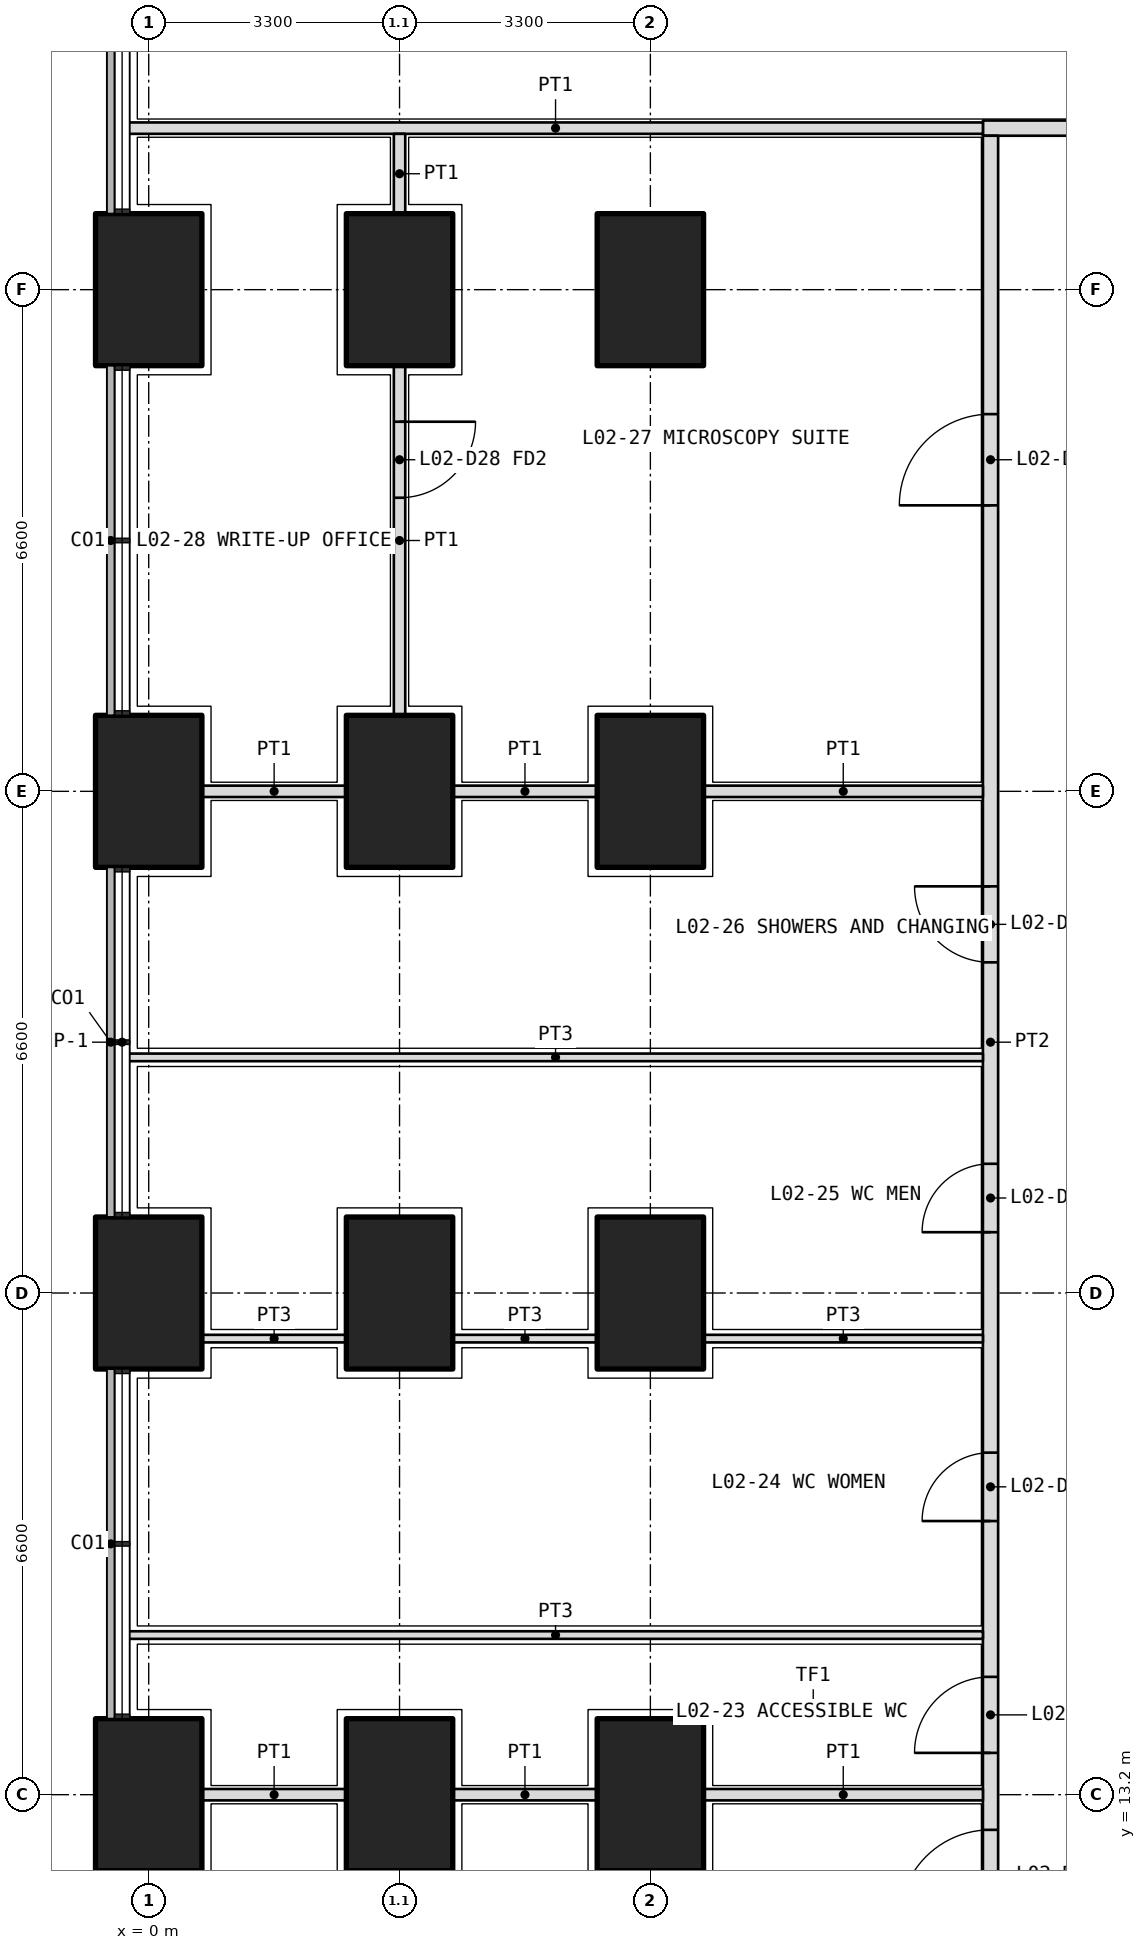
"""IFC4 building model, lengths in metres.
Left out: names, types, materials, properties, quantities, classifications, styles, units other than length and angle.
Written with IfcOpenShell. Run it as: python <this file> out.ifc"""

import sys

from ifc_helpers import new_model, si_unit, direction, frame, frame_2d, origin, origin_2d, place, context, subcontext, project, spatial, rectangle, extrude, element, fill, save


model = new_model("IFC4")
c1 = context("Model", 3, precision=1e-05, world=origin(), true_north=direction((0.0, 1.0)))
c2 = subcontext(c1, "Body", "Model", "MODEL_VIEW")
j1 = project(units=[si_unit("LENGTHUNIT", "METRE"), si_unit("PLANEANGLEUNIT", "RADIAN")], contexts=[c1])
p1 = place(None, origin())
s1 = spatial("IfcSite", under=j1, at=p1, CompositionType="ELEMENT")
p2 = place(p1, origin())
s2 = spatial("IfcBuilding", under=s1, at=p2, CompositionType="ELEMENT")
p3 = place(p2, frame((0.0, 0.0, 12.6)))
s3 = spatial("IfcBuildingStorey", under=s2, at=p3, CompositionType="ELEMENT", Elevation=12.6)
for number, where, z_axis, x_axis in (
    (1, (0.0, 13.2, 0.0), (0.0, 0.0, 1.0), (0.0, 1.0, 0.0)),
    (2, (0.0, 19.8, 0.0), (0.0, 0.0, 1.0), (0.0, 1.0, 0.0)),
    (3, (0.0, 26.4, 0.0), (0.0, 0.0, 1.0), (0.0, 1.0, 0.0)),
    (4, (0.0, 33.0, 0.0), (0.0, 0.0, 1.0), (0.0, 1.0, 0.0)),
    (5, (3.3, 13.2, 0.0), (0.0, 0.0, 1.0), (0.0, 1.0, 0.0)),
    (6, (3.3, 19.8, 0.0), (0.0, 0.0, 1.0), (0.0, 1.0, 0.0)),
    (7, (3.3, 26.4, 0.0), (0.0, 0.0, 1.0), (0.0, 1.0, 0.0)),
    (8, (3.3, 33.0, 0.0), (0.0, 0.0, 1.0), (0.0, 1.0, 0.0)),
    (9, (6.6, 13.2, 0.0), (0.0, 0.0, 1.0), (0.0, 1.0, 0.0)),
    (10, (6.6, 19.8, 0.0), (0.0, 0.0, 1.0), (0.0, 1.0, 0.0)),
    (11, (6.6, 26.4, 0.0), (0.0, 0.0, 1.0), (0.0, 1.0, 0.0)),
    (12, (6.6, 33.0, 0.0), (0.0, 0.0, 1.0), (0.0, 1.0, 0.0)),
):
    element("IfcColumn", number, at=place(p3, frame(where, z_axis=z_axis, x_axis=x_axis)), inside=s3, PredefinedType="COLUMN", context=c2, shape_type="SweptSolid", body=[
        extrude(rectangle(XDim=2.0, YDim=1.4, at=origin_2d()), origin(), (0.0, 0.0, 1.0), 4.5),
    ])
p4 = place(p3, frame((10.975, 35.125, 0.0), z_axis=(0.0, 0.0, 1.0), x_axis=(1.0, 0.0, 0.0)))
e13 = element("IfcWall", 13, at=p4, inside=s3, PredefinedType="PARTITIONING", context=c2, shape_type="SweptSolid", body=[
    extrude(rectangle(XDim=30.85, YDim=0.2, at=frame_2d((15.425, 0.0))), origin(), (0.0, 0.0, 1.0), 3.15),
])
p5 = place(p4, frame((3.962, 0.0, 0.0)))
e14 = element("IfcOpeningElement", 14, at=p5, cuts=e13, PredefinedType="OPENING", context=c2, shape_type="SweptSolid", body=[
    extrude(rectangle(XDim=1.0, YDim=2.1, at=frame_2d((0.5, 1.05))), frame((0.0, 0.11, 0.0), z_axis=(0.0, -1.0, 0.0), x_axis=(1.0, 0.0, 0.0)), (0.0, 0.0, 1.0), 0.22),
])
p6 = place(p4, frame((14.825, 0.0, 0.0)))
e15 = element("IfcOpeningElement", 15, at=p6, cuts=e13, PredefinedType="OPENING", context=c2, shape_type="SweptSolid", body=[
    extrude(rectangle(XDim=1.2, YDim=2.1, at=frame_2d((0.6, 1.05))), frame((0.0, 0.11, 0.0), z_axis=(0.0, -1.0, 0.0), x_axis=(1.0, 0.0, 0.0)), (0.0, 0.0, 1.0), 0.22),
])
p7 = place(p4, frame((25.788, 0.0, 0.0)))
e16 = element("IfcOpeningElement", 16, at=p7, cuts=e13, PredefinedType="OPENING", context=c2, shape_type="SweptSolid", body=[
    extrude(rectangle(XDim=1.2, YDim=2.1, at=frame_2d((0.6, 1.05))), frame((0.0, 0.11, 0.0), z_axis=(0.0, -1.0, 0.0), x_axis=(1.0, 0.0, 0.0)), (0.0, 0.0, 1.0), 0.22),
])
p8 = place(p3, frame((11.075, 11.175, 0.0), z_axis=(0.0, 0.0, 1.0), x_axis=(0.0, 1.0, 0.0)))
e17 = element("IfcWall", 17, at=p8, inside=s3, PredefinedType="PARTITIONING", context=c2, shape_type="SweptSolid", body=[
    extrude(rectangle(XDim=23.85, YDim=0.2, at=frame_2d((11.925, 0.0))), origin(), (0.0, 0.0, 1.0), 3.15),
])
p9 = place(p8, frame((0.363, 0.0, 0.0)))
e18 = element("IfcOpeningElement", 18, at=p9, cuts=e17, PredefinedType="OPENING", context=c2, shape_type="SweptSolid", body=[
    extrude(rectangle(XDim=1.2, YDim=2.1, at=frame_2d((0.6, 1.05))), frame((0.0, 0.11, 0.0), z_axis=(0.0, -1.0, 0.0), x_axis=(1.0, 0.0, 0.0)), (0.0, 0.0, 1.0), 0.22),
])
p10 = place(p8, frame((2.575, 0.0, 0.0)))
e19 = element("IfcOpeningElement", 19, at=p10, cuts=e17, PredefinedType="OPENING", context=c2, shape_type="SweptSolid", body=[
    extrude(rectangle(XDim=1.0, YDim=2.1, at=frame_2d((0.5, 1.05))), frame((0.0, 0.11, 0.0), z_axis=(0.0, -1.0, 0.0), x_axis=(1.0, 0.0, 0.0)), (0.0, 0.0, 1.0), 0.22),
])
p11 = place(p8, frame((5.625, 0.0, 0.0)))
e20 = element("IfcOpeningElement", 20, at=p11, cuts=e17, PredefinedType="OPENING", context=c2, shape_type="SweptSolid", body=[
    extrude(rectangle(XDim=0.9, YDim=2.1, at=frame_2d((0.45, 1.05))), frame((0.0, 0.11, 0.0), z_axis=(0.0, -1.0, 0.0), x_axis=(1.0, 0.0, 0.0)), (0.0, 0.0, 1.0), 0.22),
])
p12 = place(p8, frame((9.425, 0.0, 0.0)))
e21 = element("IfcOpeningElement", 21, at=p12, cuts=e17, PredefinedType="OPENING", context=c2, shape_type="SweptSolid", body=[
    extrude(rectangle(XDim=0.9, YDim=2.1, at=frame_2d((0.45, 1.05))), frame((0.0, 0.11, 0.0), z_axis=(0.0, -1.0, 0.0), x_axis=(1.0, 0.0, 0.0)), (0.0, 0.0, 1.0), 0.22),
])
p13 = place(p8, frame((12.975, 0.0, 0.0)))
e22 = element("IfcOpeningElement", 22, at=p13, cuts=e17, PredefinedType="OPENING", context=c2, shape_type="SweptSolid", body=[
    extrude(rectangle(XDim=1.0, YDim=2.1, at=frame_2d((0.5, 1.05))), frame((0.0, 0.11, 0.0), z_axis=(0.0, -1.0, 0.0), x_axis=(1.0, 0.0, 0.0)), (0.0, 0.0, 1.0), 0.22),
])
p14 = place(p8, frame((18.988, 0.0, 0.0)))
e23 = element("IfcOpeningElement", 23, at=p14, cuts=e17, PredefinedType="OPENING", context=c2, shape_type="SweptSolid", body=[
    extrude(rectangle(XDim=1.2, YDim=2.1, at=frame_2d((0.6, 1.05))), frame((0.0, 0.11, 0.0), z_axis=(0.0, -1.0, 0.0), x_axis=(1.0, 0.0, 0.0)), (0.0, 0.0, 1.0), 0.22),
])
p15 = place(p3, frame((-0.27, 35.125, 0.0), z_axis=(0.0, 0.0, 1.0), x_axis=(1.0, 0.0, 0.0)))
e24 = element("IfcWall", 24, at=p15, inside=s3, PredefinedType="PARTITIONING", context=c2, shape_type="SweptSolid", body=[
    extrude(rectangle(XDim=11.245, YDim=0.15, at=frame_2d((5.623, 0.0))), origin(), (0.0, 0.0, 1.0), 3.0),
])
p16 = place(p3, frame((3.3, 35.05, 0.0), z_axis=(0.0, 0.0, 1.0), x_axis=(0.0, -1.0, 0.0)))
e25 = element("IfcWall", 25, at=p16, inside=s3, PredefinedType="PARTITIONING", context=c2, shape_type="SweptSolid", body=[
    extrude(rectangle(XDim=1.05, YDim=0.15, at=frame_2d((0.525, 0.0))), origin(), (0.0, 0.0, 1.0), 4.2),
])
p17 = place(p3, frame((3.3, 32.0, 0.0), z_axis=(0.0, 0.0, 1.0), x_axis=(0.0, -1.0, 0.0)))
e26 = element("IfcWall", 26, at=p17, inside=s3, PredefinedType="PARTITIONING", context=c2, shape_type="SweptSolid", body=[
    extrude(rectangle(XDim=4.6, YDim=0.15, at=frame_2d((2.3, 0.0))), origin(), (0.0, 0.0, 1.0), 4.2),
])
p18 = place(p17, frame((0.738, 0.0, 0.0)))
e27 = element("IfcOpeningElement", 27, at=p18, cuts=e26, PredefinedType="OPENING", context=c2, shape_type="SweptSolid", body=[
    extrude(rectangle(XDim=1.0, YDim=2.1, at=frame_2d((0.5, 1.05))), frame((0.0, 0.085, 0.0), z_axis=(0.0, -1.0, 0.0), x_axis=(1.0, 0.0, 0.0)), (0.0, 0.0, 1.0), 0.17),
])
p19 = place(p3, frame((3.3, 12.2, 0.0), z_axis=(0.0, 0.0, 1.0), x_axis=(0.0, -1.0, 0.0)))
e28 = element("IfcWall", 28, at=p19, inside=s3, PredefinedType="PARTITIONING", context=c2, shape_type="SweptSolid", body=[
    extrude(rectangle(XDim=4.6, YDim=0.15, at=frame_2d((2.3, 0.0))), origin(), (0.0, 0.0, 1.0), 4.2),
])
p20 = place(p19, frame((3.35, 0.0, 0.0)))
e29 = element("IfcOpeningElement", 29, at=p20, cuts=e28, PredefinedType="OPENING", context=c2, shape_type="SweptSolid", body=[
    extrude(rectangle(XDim=1.0, YDim=2.1, at=frame_2d((0.5, 1.05))), frame((0.0, 0.085, 0.0), z_axis=(0.0, -1.0, 0.0), x_axis=(1.0, 0.0, 0.0)), (0.0, 0.0, 1.0), 0.17),
])
p21 = place(p3, frame((-0.27, 15.3, 0.0), z_axis=(0.0, 0.0, 1.0), x_axis=(1.0, 0.0, 0.0)))
e30 = element("IfcWall", 30, at=p21, inside=s3, PredefinedType="PARTITIONING", context=c2, shape_type="SweptSolid", body=[
    extrude(rectangle(XDim=11.245, YDim=0.1, at=frame_2d((5.623, 0.0))), origin(), (0.0, 0.0, 1.0), 3.0),
])
p22 = place(p3, frame((0.7, 19.2, 0.0), z_axis=(0.0, 0.0, 1.0), x_axis=(1.0, 0.0, 0.0)))
e31 = element("IfcWall", 31, at=p22, inside=s3, PredefinedType="PARTITIONING", context=c2, shape_type="SweptSolid", body=[
    extrude(rectangle(XDim=1.9, YDim=0.1, at=frame_2d((0.95, 0.0))), origin(), (0.0, 0.0, 1.0), 3.15),
])
p23 = place(p3, frame((4.0, 19.2, 0.0), z_axis=(0.0, 0.0, 1.0), x_axis=(1.0, 0.0, 0.0)))
e32 = element("IfcWall", 32, at=p23, inside=s3, PredefinedType="PARTITIONING", context=c2, shape_type="SweptSolid", body=[
    extrude(rectangle(XDim=1.9, YDim=0.1, at=frame_2d((0.95, 0.0))), origin(), (0.0, 0.0, 1.0), 3.15),
])
p24 = place(p3, frame((7.3, 19.2, 0.0), z_axis=(0.0, 0.0, 1.0), x_axis=(1.0, 0.0, 0.0)))
e33 = element("IfcWall", 33, at=p24, inside=s3, PredefinedType="PARTITIONING", context=c2, shape_type="SweptSolid", body=[
    extrude(rectangle(XDim=3.675, YDim=0.1, at=frame_2d((1.837, 0.0))), origin(), (0.0, 0.0, 1.0), 3.15),
])
p25 = place(p3, frame((-0.27, 22.9, 0.0), z_axis=(0.0, 0.0, 1.0), x_axis=(1.0, 0.0, 0.0)))
e34 = element("IfcWall", 34, at=p25, inside=s3, PredefinedType="PARTITIONING", context=c2, shape_type="SweptSolid", body=[
    extrude(rectangle(XDim=11.245, YDim=0.1, at=frame_2d((5.623, 0.0))), origin(), (0.0, 0.0, 1.0), 3.0),
])
p26 = place(p3, frame((0.7, 13.2, 0.0), z_axis=(0.0, 0.0, 1.0), x_axis=(1.0, 0.0, 0.0)))
e35 = element("IfcWall", 35, at=p26, inside=s3, PredefinedType="PARTITIONING", context=c2, shape_type="SweptSolid", body=[
    extrude(rectangle(XDim=1.9, YDim=0.15, at=frame_2d((0.95, 0.0))), origin(), (0.0, 0.0, 1.0), 3.15),
])
p27 = place(p3, frame((4.0, 13.2, 0.0), z_axis=(0.0, 0.0, 1.0), x_axis=(1.0, 0.0, 0.0)))
e36 = element("IfcWall", 36, at=p27, inside=s3, PredefinedType="PARTITIONING", context=c2, shape_type="SweptSolid", body=[
    extrude(rectangle(XDim=1.9, YDim=0.15, at=frame_2d((0.95, 0.0))), origin(), (0.0, 0.0, 1.0), 3.15),
])
p28 = place(p3, frame((7.3, 13.2, 0.0), z_axis=(0.0, 0.0, 1.0), x_axis=(1.0, 0.0, 0.0)))
e37 = element("IfcWall", 37, at=p28, inside=s3, PredefinedType="PARTITIONING", context=c2, shape_type="SweptSolid", body=[
    extrude(rectangle(XDim=3.675, YDim=0.15, at=frame_2d((1.837, 0.0))), origin(), (0.0, 0.0, 1.0), 3.15),
])
p29 = place(p3, frame((0.7, 26.4, 0.0), z_axis=(0.0, 0.0, 1.0), x_axis=(1.0, 0.0, 0.0)))
e38 = element("IfcWall", 38, at=p29, inside=s3, PredefinedType="PARTITIONING", context=c2, shape_type="SweptSolid", body=[
    extrude(rectangle(XDim=1.9, YDim=0.15, at=frame_2d((0.95, 0.0))), origin(), (0.0, 0.0, 1.0), 3.15),
])
p30 = place(p3, frame((4.0, 26.4, 0.0), z_axis=(0.0, 0.0, 1.0), x_axis=(1.0, 0.0, 0.0)))
e39 = element("IfcWall", 39, at=p30, inside=s3, PredefinedType="PARTITIONING", context=c2, shape_type="SweptSolid", body=[
    extrude(rectangle(XDim=1.9, YDim=0.15, at=frame_2d((0.95, 0.0))), origin(), (0.0, 0.0, 1.0), 3.15),
])
p31 = place(p3, frame((7.3, 26.4, 0.0), z_axis=(0.0, 0.0, 1.0), x_axis=(1.0, 0.0, 0.0)))
e40 = element("IfcWall", 40, at=p31, inside=s3, PredefinedType="PARTITIONING", context=c2, shape_type="SweptSolid", body=[
    extrude(rectangle(XDim=3.675, YDim=0.15, at=frame_2d((1.837, 0.0))), origin(), (0.0, 0.0, 1.0), 3.15),
])
p32 = place(p9, origin())
e41 = element("IfcDoor", 41, at=p32, inside=s3, OperationType="DOUBLE_DOOR_SINGLE_SWING", PredefinedType="DOOR", context=c2, shape_type="SweptSolid", body=[
    extrude(rectangle(XDim=1.2, YDim=2.1, at=frame_2d((0.6, 1.05))), frame((0.0, 0.025, 0.0), z_axis=(0.0, -1.0, 0.0), x_axis=(1.0, 0.0, 0.0)), (0.0, 0.0, 1.0), 0.05),
])
fill(e18, e41)
p33 = place(p10, origin())
e42 = element("IfcDoor", 42, at=p33, inside=s3, OperationType="SINGLE_SWING_LEFT", PredefinedType="DOOR", context=c2, shape_type="SweptSolid", body=[
    extrude(rectangle(XDim=1.0, YDim=2.1, at=frame_2d((0.5, 1.05))), frame((0.0, 0.025, 0.0), z_axis=(0.0, -1.0, 0.0), x_axis=(1.0, 0.0, 0.0)), (0.0, 0.0, 1.0), 0.05),
])
fill(e19, e42)
p34 = place(p11, origin())
e43 = element("IfcDoor", 43, at=p34, inside=s3, OperationType="SINGLE_SWING_LEFT", PredefinedType="DOOR", context=c2, shape_type="SweptSolid", body=[
    extrude(rectangle(XDim=0.9, YDim=2.1, at=frame_2d((0.45, 1.05))), frame((0.0, 0.025, 0.0), z_axis=(0.0, -1.0, 0.0), x_axis=(1.0, 0.0, 0.0)), (0.0, 0.0, 1.0), 0.05),
])
fill(e20, e43)
p35 = place(p12, origin())
e44 = element("IfcDoor", 44, at=p35, inside=s3, OperationType="SINGLE_SWING_LEFT", PredefinedType="DOOR", context=c2, shape_type="SweptSolid", body=[
    extrude(rectangle(XDim=0.9, YDim=2.1, at=frame_2d((0.45, 1.05))), frame((0.0, 0.025, 0.0), z_axis=(0.0, -1.0, 0.0), x_axis=(1.0, 0.0, 0.0)), (0.0, 0.0, 1.0), 0.05),
])
fill(e21, e44)
p36 = place(p13, origin())
e45 = element("IfcDoor", 45, at=p36, inside=s3, OperationType="SINGLE_SWING_RIGHT", PredefinedType="DOOR", context=c2, shape_type="SweptSolid", body=[
    extrude(rectangle(XDim=1.0, YDim=2.1, at=frame_2d((0.5, 1.05))), frame((0.0, 0.025, 0.0), z_axis=(0.0, -1.0, 0.0), x_axis=(1.0, 0.0, 0.0)), (0.0, 0.0, 1.0), 0.05),
])
fill(e22, e45)
p37 = place(p14, origin())
e46 = element("IfcDoor", 46, at=p37, inside=s3, OperationType="DOUBLE_DOOR_SINGLE_SWING", PredefinedType="DOOR", context=c2, shape_type="SweptSolid", body=[
    extrude(rectangle(XDim=1.2, YDim=2.1, at=frame_2d((0.6, 1.05))), frame((0.0, 0.025, 0.0), z_axis=(0.0, -1.0, 0.0), x_axis=(1.0, 0.0, 0.0)), (0.0, 0.0, 1.0), 0.05),
])
fill(e23, e46)
p38 = place(p18, origin())
e47 = element("IfcDoor", 47, at=p38, inside=s3, OperationType="SINGLE_SWING_LEFT", PredefinedType="DOOR", context=c2, shape_type="SweptSolid", body=[
    extrude(rectangle(XDim=1.0, YDim=2.1, at=frame_2d((0.5, 1.05))), frame((0.0, 0.025, 0.0), z_axis=(0.0, -1.0, 0.0), x_axis=(1.0, 0.0, 0.0)), (0.0, 0.0, 1.0), 0.05),
])
fill(e27, e47)
save(model, sys.argv[1])
